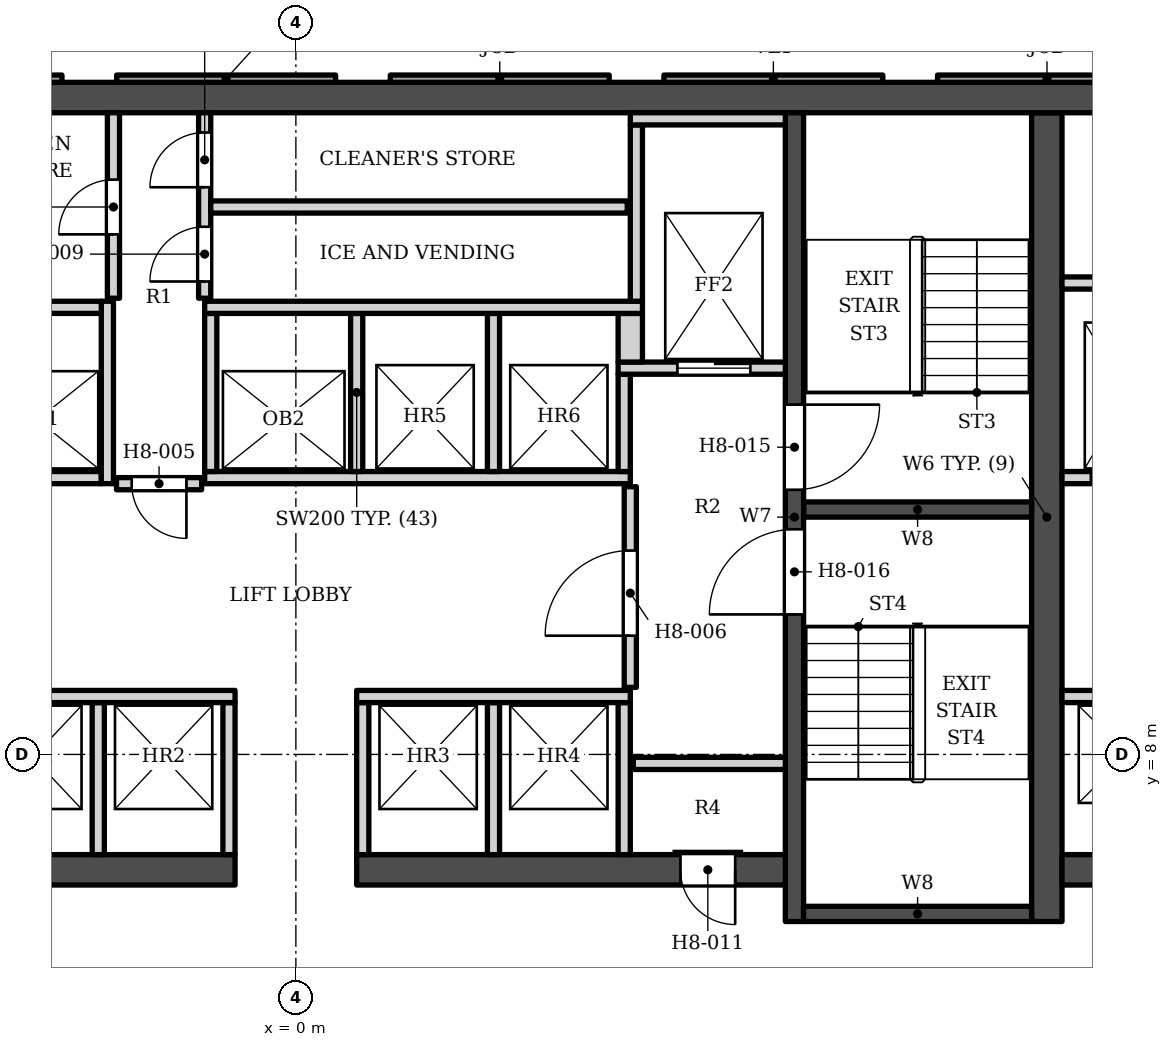
"""IFC4 building model, lengths in metres.
Left out: names, types, materials, properties, quantities, classifications, styles, units other than length and angle.
Written with IfcOpenShell. Run it as: python <this file> out.ifc"""

import sys

from ifc_helpers import new_model, si_unit, direction, frame, frame_2d, origin, place, context, subcontext, project, spatial, polyline, rectangle, outline, extrude, element, fill, save


model = new_model("IFC4")
c1 = context("Model", 3, precision=1e-05, world=origin(), true_north=direction((0.0, 1.0)))
c2 = subcontext(c1, "Body", "Model", "MODEL_VIEW")
j1 = project(units=[si_unit("LENGTHUNIT", "METRE"), si_unit("PLANEANGLEUNIT", "RADIAN")], contexts=[c1])
p1 = place(None, origin())
s1 = spatial("IfcSite", under=j1, at=p1, CompositionType="ELEMENT")
p2 = place(p1, origin())
s2 = spatial("IfcBuilding", under=s1, at=p2, CompositionType="ELEMENT")
p3 = place(p2, frame((0.0, 0.0, 122.4)))
s3 = spatial("IfcBuildingStorey", under=s2, at=p3, CompositionType="ELEMENT", Elevation=122.4)
p4 = place(p3, frame((-16.9, 18.802, 0.0), z_axis=(0.0, 0.0, 1.0), x_axis=(1.0, 0.0, 0.0)))
e1 = element("IfcWall", 1, at=p4, inside=s3, PredefinedType="SHEAR", context=c2, shape_type="SweptSolid", body=[
    extrude(rectangle(XDim=33.8, YDim=0.5, at=frame_2d((16.9, 0.0))), origin(), (0.0, 0.0, 1.0), 3.4),
])
p5 = place(p3, frame((12.35, 5.253, 0.0), z_axis=(0.0, 0.0, 1.0), x_axis=(0.0, 1.0, 0.0)))
e2 = element("IfcWall", 2, at=p5, inside=s3, PredefinedType="SHEAR", context=c2, shape_type="SweptSolid", body=[
    extrude(rectangle(XDim=13.3, YDim=0.5, at=frame_2d((6.65, 0.0))), origin(), (0.0, 0.0, 1.0), 3.4),
])
p6 = place(p3, frame((8.2, 5.253, 0.0), z_axis=(0.0, 0.0, 1.0), x_axis=(0.0, 1.0, 0.0)))
e3 = element("IfcWall", 3, at=p6, inside=s3, PredefinedType="SHEAR", context=c2, shape_type="SweptSolid", body=[
    extrude(rectangle(XDim=13.3, YDim=0.3, at=frame_2d((6.65, 0.0))), origin(), (0.0, 0.0, 1.0), 3.4),
])
p7 = place(p6, frame((7.1, 0.0, 0.0)))
e4 = element("IfcOpeningElement", 4, at=p7, cuts=e3, PredefinedType="OPENING", context=c2, shape_type="SweptSolid", body=[
    extrude(rectangle(XDim=1.4, YDim=2.1, at=frame_2d((0.7, 1.05))), frame((0.0, 0.16, 0.0), z_axis=(0.0, -1.0, 0.0), x_axis=(1.0, 0.0, 0.0)), (0.0, 0.0, 1.0), 0.32),
])
p8 = place(p6, frame((5.05, 0.0, 0.0)))
e5 = element("IfcOpeningElement", 5, at=p8, cuts=e3, PredefinedType="OPENING", context=c2, shape_type="SweptSolid", body=[
    extrude(rectangle(XDim=1.4, YDim=2.1, at=frame_2d((0.7, 1.05))), frame((0.0, 0.16, 0.0), z_axis=(0.0, -1.0, 0.0), x_axis=(1.0, 0.0, 0.0)), (0.0, 0.0, 1.0), 0.32),
])
for number, where, z_axis, x_axis in (
    (6, (8.35, 12.028, 0.0), (0.0, 0.0, 1.0), (1.0, 0.0, 0.0)),
    (7, (8.35, 5.378, 0.0), (0.0, 0.0, 1.0), (1.0, 0.0, 0.0)),
):
    element("IfcWall", number, at=place(p3, frame(where, z_axis=z_axis, x_axis=x_axis)), inside=s3, PredefinedType="SHEAR", context=c2, shape_type="SweptSolid", body=[
        extrude(rectangle(XDim=3.75, YDim=0.25, at=frame_2d((1.875, 0.0))), origin(), (0.0, 0.0, 1.0), 3.4),
    ])
p9 = place(p3, frame((-8.05, 6.103, 0.0), z_axis=(0.0, 0.0, 1.0), x_axis=(1.0, 0.0, 0.0)))
e8 = element("IfcWall", 8, at=p9, inside=s3, PredefinedType="SHEAR", context=c2, shape_type="SweptSolid", body=[
    extrude(rectangle(XDim=7.05, YDim=0.5, at=frame_2d((3.525, 0.0))), origin(), (0.0, 0.0, 1.0), 3.4),
])
p10 = place(p9, frame((0.825, 0.0, 0.0)))
e9 = element("IfcOpeningElement", 9, at=p10, cuts=e8, PredefinedType="OPENING", context=c2, shape_type="SweptSolid", body=[
    extrude(rectangle(XDim=0.9, YDim=2.1, at=frame_2d((0.45, 1.05))), frame((0.0, 0.26, 0.0), z_axis=(0.0, -1.0, 0.0), x_axis=(1.0, 0.0, 0.0)), (0.0, 0.0, 1.0), 0.52),
])
p11 = place(p3, frame((1.0, 6.103, 0.0), z_axis=(0.0, 0.0, 1.0), x_axis=(1.0, 0.0, 0.0)))
e10 = element("IfcWall", 10, at=p11, inside=s3, PredefinedType="SHEAR", context=c2, shape_type="SweptSolid", body=[
    extrude(rectangle(XDim=7.05, YDim=0.5, at=frame_2d((3.525, 0.0))), origin(), (0.0, 0.0, 1.0), 3.4),
])
p12 = place(p11, frame((5.325, 0.0, 0.0)))
e11 = element("IfcOpeningElement", 11, at=p12, cuts=e10, PredefinedType="OPENING", context=c2, shape_type="SweptSolid", body=[
    extrude(rectangle(XDim=0.9, YDim=2.1, at=frame_2d((0.45, 1.05))), frame((0.0, 0.26, 0.0), z_axis=(0.0, -1.0, 0.0), x_axis=(1.0, 0.0, 0.0)), (0.0, 0.0, 1.0), 0.52),
])
p13 = place(p3, frame((12.6, 6.103, 0.0), z_axis=(0.0, 0.0, 1.0), x_axis=(1.0, 0.0, 0.0)))
e12 = element("IfcWall", 12, at=p13, inside=s3, PredefinedType="SHEAR", context=c2, shape_type="SweptSolid", body=[
    extrude(rectangle(XDim=4.3, YDim=0.5, at=frame_2d((2.15, 0.0))), origin(), (0.0, 0.0, 1.0), 3.4),
])
p14 = place(p3, origin())
e13 = element("IfcWall", 13, at=p14, inside=s3, PredefinedType="SOLIDWALL", context=c2, shape_type="SweptSolid", body=[
    extrude(outline(polyline([(10.553, 19.173), (10.553, 19.052), (14.153, 19.052), (14.153, 19.173), (10.553, 19.173)])), origin(), (0.0, 0.0, 1.0), 2.65),
])
p15 = place(p3, origin())
e14 = element("IfcWall", 14, at=p15, inside=s3, PredefinedType="ELEMENTEDWALL", context=c2, shape_type="SweptSolid", body=[
    extrude(outline(polyline([(6.053, 19.173), (6.053, 19.052), (9.653, 19.052), (9.653, 19.173), (6.053, 19.173)])), origin(), (0.0, 0.0, 1.0), 2.65),
])
p16 = place(p3, origin())
e15 = element("IfcWall", 15, at=p16, inside=s3, PredefinedType="SOLIDWALL", context=c2, shape_type="SweptSolid", body=[
    extrude(outline(polyline([(1.553, 19.173), (1.553, 19.052), (5.153, 19.052), (5.153, 19.173), (1.553, 19.173)])), origin(), (0.0, 0.0, 1.0), 2.65),
])
p17 = place(p3, origin())
e16 = element("IfcWall", 16, at=p17, inside=s3, PredefinedType="ELEMENTEDWALL", context=c2, shape_type="SweptSolid", body=[
    extrude(outline(polyline([(-2.947, 19.173), (-2.947, 19.052), (0.653, 19.052), (0.653, 19.173), (-2.947, 19.173)])), origin(), (0.0, 0.0, 1.0), 2.65),
])
p18 = place(p3, origin())
e17 = element("IfcWall", 17, at=p18, inside=s3, PredefinedType="SOLIDWALL", context=c2, shape_type="SweptSolid", body=[
    extrude(outline(polyline([(-7.447, 19.173), (-7.447, 19.052), (-3.847, 19.052), (-3.847, 19.173), (-7.447, 19.173)])), origin(), (0.0, 0.0, 1.0), 2.65),
])
for number, where, z_axis, x_axis in (
    (18, (-3.25, 6.353, 0.0), (0.0, 0.0, 1.0), (0.0, 1.0, 0.0)),
    (19, (-1.1, 6.353, 0.0), (0.0, 0.0, 1.0), (0.0, 1.0, 0.0)),
    (20, (1.1, 6.353, 0.0), (0.0, 0.0, 1.0), (0.0, 1.0, 0.0)),
    (21, (3.25, 6.353, 0.0), (0.0, 0.0, 1.0), (0.0, 1.0, 0.0)),
    (22, (5.4, 6.353, 0.0), (0.0, 0.0, 1.0), (0.0, 1.0, 0.0)),
    (23, (5.55, 7.853, 0.0), (0.0, 0.0, 1.0), (1.0, 0.0, 0.0)),
):
    element("IfcWall", number, at=place(p3, frame(where, z_axis=z_axis, x_axis=x_axis)), inside=s3, PredefinedType="SOLIDWALL", context=c2, shape_type="SweptSolid", body=[
        extrude(rectangle(XDim=2.5, YDim=0.2, at=frame_2d((1.25, 0.0))), origin(), (0.0, 0.0, 1.0), 3.23),
    ])
for number, where, z_axis, x_axis in (
    (24, (-5.5, 8.953, 0.0), (0.0, 0.0, 1.0), (1.0, 0.0, 0.0)),
    (25, (1.0, 8.953, 0.0), (0.0, 0.0, 1.0), (1.0, 0.0, 0.0)),
):
    element("IfcWall", number, at=place(p3, frame(where, z_axis=z_axis, x_axis=x_axis)), inside=s3, PredefinedType="SOLIDWALL", context=c2, shape_type="SweptSolid", body=[
        extrude(rectangle(XDim=4.5, YDim=0.2, at=frame_2d((2.25, 0.0))), origin(), (0.0, 0.0, 1.0), 3.23),
    ])
p19 = place(p3, frame((12.6, 8.953, 0.0), z_axis=(0.0, 0.0, 1.0), x_axis=(1.0, 0.0, 0.0)))
e26 = element("IfcWall", 26, at=p19, inside=s3, PredefinedType="SOLIDWALL", context=c2, shape_type="SweptSolid", body=[
    extrude(rectangle(XDim=4.3, YDim=0.2, at=frame_2d((2.15, 0.0))), origin(), (0.0, 0.0, 1.0), 3.23),
])
p20 = place(p19, frame((0.525, 0.0, 0.0)))
e27 = element("IfcOpeningElement", 27, at=p20, cuts=e26, PredefinedType="OPENING", context=c2, shape_type="SweptSolid", body=[
    extrude(rectangle(XDim=1.1, YDim=2.1, at=frame_2d((0.55, 1.05))), frame((0.0, 0.11, 0.0), z_axis=(0.0, -1.0, 0.0), x_axis=(1.0, 0.0, 0.0)), (0.0, 0.0, 1.0), 0.22),
])
p21 = place(p19, frame((2.775, 0.0, 0.0)))
e28 = element("IfcOpeningElement", 28, at=p21, cuts=e26, PredefinedType="OPENING", context=c2, shape_type="SweptSolid", body=[
    extrude(rectangle(XDim=1.1, YDim=2.1, at=frame_2d((0.55, 1.05))), frame((0.0, 0.11, 0.0), z_axis=(0.0, -1.0, 0.0), x_axis=(1.0, 0.0, 0.0)), (0.0, 0.0, 1.0), 0.22),
])
p22 = place(p3, frame((5.5, 9.103, 0.0), z_axis=(0.0, 0.0, 1.0), x_axis=(0.0, 1.0, 0.0)))
e29 = element("IfcWall", 29, at=p22, inside=s3, PredefinedType="SOLIDWALL", context=c2, shape_type="SweptSolid", body=[
    extrude(rectangle(XDim=3.3, YDim=0.2, at=frame_2d((1.65, 0.0))), origin(), (0.0, 0.0, 1.0), 3.23),
])
p23 = place(p22, frame((0.85, 0.0, 0.0)))
e30 = element("IfcOpeningElement", 30, at=p23, cuts=e29, PredefinedType="OPENING", context=c2, shape_type="SweptSolid", body=[
    extrude(rectangle(XDim=1.4, YDim=2.1, at=frame_2d((0.7, 1.05))), frame((0.0, 0.11, 0.0), z_axis=(0.0, -1.0, 0.0), x_axis=(1.0, 0.0, 0.0)), (0.0, 0.0, 1.0), 0.22),
])
p24 = place(p3, frame((-2.95, 12.453, 0.0), z_axis=(0.0, 0.0, 1.0), x_axis=(1.0, 0.0, 0.0)))
e31 = element("IfcWall", 31, at=p24, inside=s3, PredefinedType="SOLIDWALL", context=c2, shape_type="SweptSolid", body=[
    extrude(rectangle(XDim=1.4, YDim=0.2, at=frame_2d((0.7, 0.0))), origin(), (0.0, 0.0, 1.0), 3.23),
])
p25 = place(p24, frame((0.25, 0.0, 0.0)))
e32 = element("IfcOpeningElement", 32, at=p25, cuts=e31, PredefinedType="OPENING", context=c2, shape_type="SweptSolid", body=[
    extrude(rectangle(XDim=0.9, YDim=2.1, at=frame_2d((0.45, 1.05))), frame((0.0, 0.11, 0.0), z_axis=(0.0, -1.0, 0.0), x_axis=(1.0, 0.0, 0.0)), (0.0, 0.0, 1.0), 0.22),
])
p26 = place(p3, frame((-5.3, 12.552, 0.0), z_axis=(0.0, 0.0, 1.0), x_axis=(1.0, 0.0, 0.0)))
e33 = element("IfcWall", 33, at=p26, inside=s3, PredefinedType="SOLIDWALL", context=c2, shape_type="SweptSolid", body=[
    extrude(rectangle(XDim=2.1, YDim=0.2, at=frame_2d((1.05, 0.0))), origin(), (0.0, 0.0, 1.0), 3.23),
])
p27 = place(p3, frame((-3.1, 12.453, 0.0), z_axis=(0.0, 0.0, 1.0), x_axis=(0.0, 1.0, 0.0)))
e34 = element("IfcWall", 34, at=p27, inside=s3, PredefinedType="SOLIDWALL", context=c2, shape_type="SweptSolid", body=[
    extrude(rectangle(XDim=3.0, YDim=0.2, at=frame_2d((1.5, 0.0))), origin(), (0.0, 0.0, 1.0), 3.23),
])
p28 = place(p3, frame((-1.5, 12.552, 0.0), z_axis=(0.0, 0.0, 1.0), x_axis=(1.0, 0.0, 0.0)))
e35 = element("IfcWall", 35, at=p28, inside=s3, PredefinedType="SOLIDWALL", context=c2, shape_type="SweptSolid", body=[
    extrude(rectangle(XDim=7.0, YDim=0.2, at=frame_2d((3.5, 0.0))), origin(), (0.0, 0.0, 1.0), 3.23),
])
p29 = place(p3, frame((12.6, 12.552, 0.0), z_axis=(0.0, 0.0, 1.0), x_axis=(1.0, 0.0, 0.0)))
e36 = element("IfcWall", 36, at=p29, inside=s3, PredefinedType="SOLIDWALL", context=c2, shape_type="SweptSolid", body=[
    extrude(rectangle(XDim=4.3, YDim=0.2, at=frame_2d((2.15, 0.0))), origin(), (0.0, 0.0, 1.0), 3.23),
])
p30 = place(p29, frame((0.475, 0.0, 0.0)))
e37 = element("IfcOpeningElement", 37, at=p30, cuts=e36, PredefinedType="OPENING", context=c2, shape_type="SweptSolid", body=[
    extrude(rectangle(XDim=1.2, YDim=2.1, at=frame_2d((0.6, 1.05))), frame((0.0, 0.11, 0.0), z_axis=(0.0, -1.0, 0.0), x_axis=(1.0, 0.0, 0.0)), (0.0, 0.0, 1.0), 0.22),
])
p31 = place(p29, frame((2.625, 0.0, 0.0)))
e38 = element("IfcOpeningElement", 38, at=p31, cuts=e36, PredefinedType="OPENING", context=c2, shape_type="SweptSolid", body=[
    extrude(rectangle(XDim=1.4, YDim=2.1, at=frame_2d((0.7, 1.05))), frame((0.0, 0.11, 0.0), z_axis=(0.0, -1.0, 0.0), x_axis=(1.0, 0.0, 0.0)), (0.0, 0.0, 1.0), 0.22),
])
for number, where, z_axis, x_axis in (
    (39, (-1.4, 12.653, 0.0), (0.0, 0.0, 1.0), (0.0, 1.0, 0.0)),
    (40, (1.0, 12.653, 0.0), (0.0, 0.0, 1.0), (0.0, 1.0, 0.0)),
    (41, (3.25, 12.653, 0.0), (0.0, 0.0, 1.0), (0.0, 1.0, 0.0)),
):
    element("IfcWall", number, at=place(p3, frame(where, z_axis=z_axis, x_axis=x_axis)), inside=s3, PredefinedType="SOLIDWALL", context=c2, shape_type="SweptSolid", body=[
        extrude(rectangle(XDim=2.6, YDim=0.2, at=frame_2d((1.3, 0.0))), origin(), (0.0, 0.0, 1.0), 3.23),
    ])
p32 = place(p3, frame((5.4, 12.653, 0.0), z_axis=(0.0, 0.0, 1.0), x_axis=(0.0, 1.0, 0.0)))
e42 = element("IfcWall", 42, at=p32, inside=s3, PredefinedType="SOLIDWALL", context=c2, shape_type="SweptSolid", body=[
    extrude(rectangle(XDim=1.6, YDim=0.2, at=frame_2d((0.8, 0.0))), origin(), (0.0, 0.0, 1.0), 3.23),
])
p33 = place(p3, frame((5.3, 14.353, 0.0), z_axis=(0.0, 0.0, 1.0), x_axis=(1.0, 0.0, 0.0)))
e43 = element("IfcWall", 43, at=p33, inside=s3, PredefinedType="SOLIDWALL", context=c2, shape_type="SweptSolid", body=[
    extrude(rectangle(XDim=2.75, YDim=0.2, at=frame_2d((1.375, 0.0))), origin(), (0.0, 0.0, 1.0), 3.23),
])
p34 = place(p33, frame((0.975, 0.0, 0.0)))
e44 = element("IfcOpeningElement", 44, at=p34, cuts=e43, PredefinedType="OPENING", context=c2, shape_type="SweptSolid", body=[
    extrude(rectangle(XDim=1.2, YDim=2.1, at=frame_2d((0.6, 1.05))), frame((0.0, 0.11, 0.0), z_axis=(0.0, -1.0, 0.0), x_axis=(1.0, 0.0, 0.0)), (0.0, 0.0, 1.0), 0.22),
])
p35 = place(p3, frame((5.5, 14.453, 0.0), z_axis=(0.0, 0.0, 1.0), x_axis=(0.0, 1.0, 0.0)))
e45 = element("IfcWall", 45, at=p35, inside=s3, PredefinedType="SOLIDWALL", context=c2, shape_type="SweptSolid", body=[
    extrude(rectangle(XDim=0.8, YDim=0.4, at=frame_2d((0.4, 0.0))), origin(), (0.0, 0.0, 1.0), 3.23),
])
p36 = place(p3, frame((-5.3, 15.353, 0.0), z_axis=(0.0, 0.0, 1.0), x_axis=(1.0, 0.0, 0.0)))
e46 = element("IfcWall", 46, at=p36, inside=s3, PredefinedType="SOLIDWALL", context=c2, shape_type="SweptSolid", body=[
    extrude(rectangle(XDim=2.1, YDim=0.2, at=frame_2d((1.05, 0.0))), origin(), (0.0, 0.0, 1.0), 3.23),
])
p37 = place(p3, frame((-1.5, 15.353, 0.0), z_axis=(0.0, 0.0, 1.0), x_axis=(1.0, 0.0, 0.0)))
e47 = element("IfcWall", 47, at=p37, inside=s3, PredefinedType="SOLIDWALL", context=c2, shape_type="SweptSolid", body=[
    extrude(rectangle(XDim=7.2, YDim=0.2, at=frame_2d((3.6, 0.0))), origin(), (0.0, 0.0, 1.0), 3.23),
])
p38 = place(p3, frame((5.6, 15.453, 0.0), z_axis=(0.0, 0.0, 1.0), x_axis=(0.0, 1.0, 0.0)))
e48 = element("IfcWall", 48, at=p38, inside=s3, PredefinedType="SOLIDWALL", context=c2, shape_type="SweptSolid", body=[
    extrude(rectangle(XDim=2.9, YDim=0.2, at=frame_2d((1.45, 0.0))), origin(), (0.0, 0.0, 1.0), 3.23),
])
p39 = place(p3, frame((-3.0, 15.503, 0.0), z_axis=(0.0, 0.0, 1.0), x_axis=(0.0, 1.0, 0.0)))
e49 = element("IfcWall", 49, at=p39, inside=s3, PredefinedType="SOLIDWALL", context=c2, shape_type="SweptSolid", body=[
    extrude(rectangle(XDim=3.05, YDim=0.2, at=frame_2d((1.525, 0.0))), origin(), (0.0, 0.0, 1.0), 3.23),
])
p40 = place(p39, frame((1.05, 0.0, 0.0)))
e50 = element("IfcOpeningElement", 50, at=p40, cuts=e49, PredefinedType="OPENING", context=c2, shape_type="SweptSolid", body=[
    extrude(rectangle(XDim=0.9, YDim=2.1, at=frame_2d((0.45, 1.05))), frame((0.0, 0.11, 0.0), z_axis=(0.0, -1.0, 0.0), x_axis=(1.0, 0.0, 0.0)), (0.0, 0.0, 1.0), 0.22),
])
p41 = place(p3, frame((-1.5, 15.503, 0.0), z_axis=(0.0, 0.0, 1.0), x_axis=(0.0, 1.0, 0.0)))
e51 = element("IfcWall", 51, at=p41, inside=s3, PredefinedType="SOLIDWALL", context=c2, shape_type="SweptSolid", body=[
    extrude(rectangle(XDim=3.05, YDim=0.2, at=frame_2d((1.525, 0.0))), origin(), (0.0, 0.0, 1.0), 3.23),
])
p42 = place(p41, frame((0.275, 0.0, 0.0)))
e52 = element("IfcOpeningElement", 52, at=p42, cuts=e51, PredefinedType="OPENING", context=c2, shape_type="SweptSolid", body=[
    extrude(rectangle(XDim=0.9, YDim=2.1, at=frame_2d((0.45, 1.05))), frame((0.0, 0.11, 0.0), z_axis=(0.0, -1.0, 0.0), x_axis=(1.0, 0.0, 0.0)), (0.0, 0.0, 1.0), 0.22),
])
p43 = place(p41, frame((1.825, 0.0, 0.0)))
e53 = element("IfcOpeningElement", 53, at=p43, cuts=e51, PredefinedType="OPENING", context=c2, shape_type="SweptSolid", body=[
    extrude(rectangle(XDim=0.9, YDim=2.1, at=frame_2d((0.45, 1.05))), frame((0.0, 0.11, 0.0), z_axis=(0.0, -1.0, 0.0), x_axis=(1.0, 0.0, 0.0)), (0.0, 0.0, 1.0), 0.22),
])
p44 = place(p3, frame((12.6, 15.753, 0.0), z_axis=(0.0, 0.0, 1.0), x_axis=(1.0, 0.0, 0.0)))
e54 = element("IfcWall", 54, at=p44, inside=s3, PredefinedType="SOLIDWALL", context=c2, shape_type="SweptSolid", body=[
    extrude(rectangle(XDim=4.3, YDim=0.2, at=frame_2d((2.15, 0.0))), origin(), (0.0, 0.0, 1.0), 3.23),
])
p45 = place(p3, frame((-1.4, 17.003, 0.0), z_axis=(0.0, 0.0, 1.0), x_axis=(1.0, 0.0, 0.0)))
e55 = element("IfcWall", 55, at=p45, inside=s3, PredefinedType="SOLIDWALL", context=c2, shape_type="SweptSolid", body=[
    extrude(rectangle(XDim=6.85, YDim=0.2, at=frame_2d((3.425, 0.0))), origin(), (0.0, 0.0, 1.0), 3.23),
])
p46 = place(p3, frame((5.5, 18.453, 0.0), z_axis=(0.0, 0.0, 1.0), x_axis=(1.0, 0.0, 0.0)))
e56 = element("IfcWall", 56, at=p46, inside=s3, PredefinedType="SOLIDWALL", context=c2, shape_type="SweptSolid", body=[
    extrude(rectangle(XDim=2.55, YDim=0.2, at=frame_2d((1.275, 0.0))), origin(), (0.0, 0.0, 1.0), 3.23),
])
p47 = place(p34, origin())
e57 = element("IfcDoor", 57, at=p47, inside=s3, OperationType="DOUBLE_DOOR_SLIDING", PredefinedType="DOOR", context=c2, shape_type="SweptSolid", body=[
    extrude(rectangle(XDim=1.2, YDim=2.1, at=frame_2d((0.6, 1.05))), frame((0.0, 0.025, 0.0), z_axis=(0.0, -1.0, 0.0), x_axis=(1.0, 0.0, 0.0)), (0.0, 0.0, 1.0), 0.05),
])
fill(e44, e57)
p48 = place(p30, origin())
e58 = element("IfcDoor", 58, at=p48, inside=s3, OperationType="DOUBLE_DOOR_SLIDING", PredefinedType="DOOR", context=c2, shape_type="SweptSolid", body=[
    extrude(rectangle(XDim=1.2, YDim=2.1, at=frame_2d((0.6, 1.05))), frame((0.0, 0.025, 0.0), z_axis=(0.0, -1.0, 0.0), x_axis=(1.0, 0.0, 0.0)), (0.0, 0.0, 1.0), 0.05),
])
fill(e37, e58)
p49 = place(p7, origin())
e59 = element("IfcDoor", 59, at=p49, inside=s3, OperationType="SINGLE_SWING_RIGHT", PredefinedType="DOOR", context=c2, shape_type="SweptSolid", body=[
    extrude(rectangle(XDim=1.4, YDim=2.1, at=frame_2d((0.7, 1.05))), frame((0.0, 0.025, 0.0), z_axis=(0.0, -1.0, 0.0), x_axis=(1.0, 0.0, 0.0)), (0.0, 0.0, 1.0), 0.05),
])
fill(e4, e59)
p50 = place(p8, origin())
e60 = element("IfcDoor", 60, at=p50, inside=s3, OperationType="SINGLE_SWING_LEFT", PredefinedType="DOOR", context=c2, shape_type="SweptSolid", body=[
    extrude(rectangle(XDim=1.4, YDim=2.1, at=frame_2d((0.7, 1.05))), frame((0.0, 0.025, 0.0), z_axis=(0.0, -1.0, 0.0), x_axis=(1.0, 0.0, 0.0)), (0.0, 0.0, 1.0), 0.05),
])
fill(e5, e60)
p51 = place(p25, origin())
e61 = element("IfcDoor", 61, at=p51, inside=s3, OperationType="SINGLE_SWING_RIGHT", PredefinedType="DOOR", context=c2, shape_type="SweptSolid", body=[
    extrude(rectangle(XDim=0.9, YDim=2.1, at=frame_2d((0.45, 1.05))), frame((0.0, 0.025, 0.0), z_axis=(0.0, -1.0, 0.0), x_axis=(1.0, 0.0, 0.0)), (0.0, 0.0, 1.0), 0.05),
])
fill(e32, e61)
p52 = place(p23, origin())
e62 = element("IfcDoor", 62, at=p52, inside=s3, OperationType="SINGLE_SWING_LEFT", PredefinedType="DOOR", context=c2, shape_type="SweptSolid", body=[
    extrude(rectangle(XDim=1.4, YDim=2.1, at=frame_2d((0.7, 1.05))), frame((0.0, 0.025, 0.0), z_axis=(0.0, -1.0, 0.0), x_axis=(1.0, 0.0, 0.0)), (0.0, 0.0, 1.0), 0.05),
])
fill(e30, e62)
p53 = place(p40, origin())
e63 = element("IfcDoor", 63, at=p53, inside=s3, OperationType="SINGLE_SWING_LEFT", PredefinedType="DOOR", context=c2, shape_type="SweptSolid", body=[
    extrude(rectangle(XDim=0.9, YDim=2.1, at=frame_2d((0.45, 1.05))), frame((0.0, 0.025, 0.0), z_axis=(0.0, -1.0, 0.0), x_axis=(1.0, 0.0, 0.0)), (0.0, 0.0, 1.0), 0.05),
])
fill(e50, e63)
p54 = place(p42, origin())
e64 = element("IfcDoor", 64, at=p54, inside=s3, OperationType="SINGLE_SWING_LEFT", PredefinedType="DOOR", context=c2, shape_type="SweptSolid", body=[
    extrude(rectangle(XDim=0.9, YDim=2.1, at=frame_2d((0.45, 1.05))), frame((0.0, 0.025, 0.0), z_axis=(0.0, -1.0, 0.0), x_axis=(1.0, 0.0, 0.0)), (0.0, 0.0, 1.0), 0.05),
])
fill(e52, e64)
p55 = place(p43, origin())
e65 = element("IfcDoor", 65, at=p55, inside=s3, OperationType="SINGLE_SWING_LEFT", PredefinedType="DOOR", context=c2, shape_type="SweptSolid", body=[
    extrude(rectangle(XDim=0.9, YDim=2.1, at=frame_2d((0.45, 1.05))), frame((0.0, 0.025, 0.0), z_axis=(0.0, -1.0, 0.0), x_axis=(1.0, 0.0, 0.0)), (0.0, 0.0, 1.0), 0.05),
])
fill(e53, e65)
p56 = place(p12, origin())
e66 = element("IfcDoor", 66, at=p56, inside=s3, OperationType="SINGLE_SWING_RIGHT", PredefinedType="DOOR", context=c2, shape_type="SweptSolid", body=[
    extrude(rectangle(XDim=0.9, YDim=2.1, at=frame_2d((0.45, 1.05))), frame((0.0, 0.025, 0.0), z_axis=(0.0, -1.0, 0.0), x_axis=(1.0, 0.0, 0.0)), (0.0, 0.0, 1.0), 0.05),
])
fill(e11, e66)
save(model, sys.argv[1])
